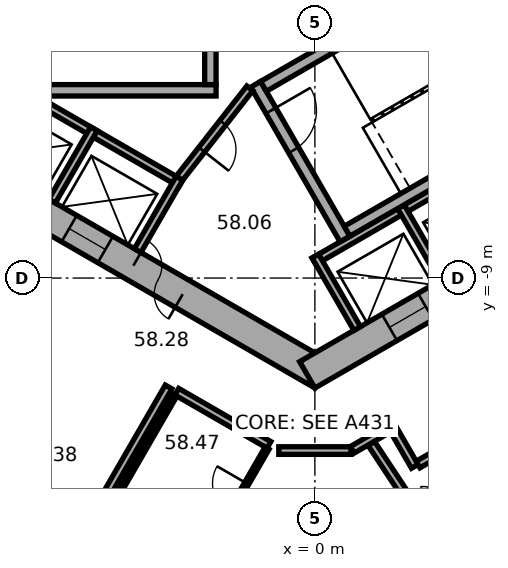
"""IFC4 building model, lengths in metres.
Left out: names, types, materials, properties, quantities, classifications, styles, units other than length and angle.
Written with IfcOpenShell. Run it as: python <this file> out.ifc"""

import sys

from ifc_helpers import new_model, si_unit, direction, frame, frame_2d, origin, place, context, subcontext, project, spatial, rectangle, extrude, element, fill, save


model = new_model("IFC4")
c1 = context("Model", 3, precision=1e-05, world=origin(), true_north=direction((0.0, 1.0)))
c2 = subcontext(c1, "Body", "Model", "MODEL_VIEW")
j1 = project(units=[si_unit("LENGTHUNIT", "METRE"), si_unit("PLANEANGLEUNIT", "RADIAN")], contexts=[c1])
p1 = place(None, origin())
s1 = spatial("IfcSite", under=j1, at=p1, CompositionType="ELEMENT")
p2 = place(p1, origin())
s2 = spatial("IfcBuilding", under=s1, at=p2, CompositionType="ELEMENT")
p3 = place(p2, frame((0.0, 0.0, 236.5)))
s3 = spatial("IfcBuildingStorey", under=s2, at=p3, CompositionType="ELEMENT", Elevation=236.5)
p4 = place(p3, frame((-10.1, -5.6, 0.0), z_axis=(0.0, 0.0, 1.0), x_axis=(0.866023897231, -0.500002609418, 0.0)))
e1 = element("IfcWall", 1, at=p4, inside=s3, PredefinedType="SHEAR", context=c2, shape_type="SweptSolid", body=[
    extrude(rectangle(XDim=11.894, YDim=0.8, at=frame_2d((5.947, 0.0))), origin(), (0.0, 0.0, 1.0), 3.7),
])
p5 = place(p4, frame((6.147, 0.0, 0.0)))
e2 = element("IfcOpeningElement", 2, at=p5, cuts=e1, PredefinedType="OPENING", context=c2, shape_type="SweptSolid", body=[
    extrude(rectangle(XDim=1.5, YDim=2.1, at=frame_2d((0.75, 1.05))), frame((0.0, 0.41, 0.0), z_axis=(0.0, -1.0, 0.0), x_axis=(1.0, 0.0, 0.0)), (0.0, 0.0, 1.0), 0.82),
])
p6 = place(p4, frame((1.597, 0.0, 0.0)))
e3 = element("IfcOpeningElement", 3, at=p6, cuts=e1, PredefinedType="OPENING", context=c2, shape_type="SweptSolid", body=[
    extrude(rectangle(XDim=1.1, YDim=2.1, at=frame_2d((0.55, 1.05))), frame((0.0, 0.41, 0.0), z_axis=(0.0, -1.0, 0.0), x_axis=(1.0, 0.0, 0.0)), (0.0, 0.0, 1.0), 0.82),
])
p7 = place(p4, frame((4.197, 0.0, 0.0)))
e4 = element("IfcOpeningElement", 4, at=p7, cuts=e1, PredefinedType="OPENING", context=c2, shape_type="SweptSolid", body=[
    extrude(rectangle(XDim=1.1, YDim=2.1, at=frame_2d((0.55, 1.05))), frame((0.0, 0.41, 0.0), z_axis=(0.0, -1.0, 0.0), x_axis=(1.0, 0.0, 0.0)), (0.0, 0.0, 1.0), 0.82),
])
p8 = place(p3, frame((-0.2, -11.547, 0.0), z_axis=(0.0, 0.0, 1.0), x_axis=(0.866023897231, 0.500002609418, 0.0)))
e5 = element("IfcWall", 5, at=p8, inside=s3, PredefinedType="SHEAR", context=c2, shape_type="SweptSolid", body=[
    extrude(rectangle(XDim=11.894, YDim=0.8, at=frame_2d((5.947, 0.0))), origin(), (0.0, 0.0, 1.0), 3.7),
])
p9 = place(p8, frame((2.497, 0.0, 0.0)))
e6 = element("IfcOpeningElement", 6, at=p9, cuts=e5, PredefinedType="OPENING", context=c2, shape_type="SweptSolid", body=[
    extrude(rectangle(XDim=1.1, YDim=2.1, at=frame_2d((0.55, 1.05))), frame((0.0, 0.41, 0.0), z_axis=(0.0, -1.0, 0.0), x_axis=(1.0, 0.0, 0.0)), (0.0, 0.0, 1.0), 0.82),
])
p10 = place(p8, frame((5.097, 0.0, 0.0)))
e7 = element("IfcOpeningElement", 7, at=p10, cuts=e5, PredefinedType="OPENING", context=c2, shape_type="SweptSolid", body=[
    extrude(rectangle(XDim=1.1, YDim=2.1, at=frame_2d((0.55, 1.05))), frame((0.0, 0.41, 0.0), z_axis=(0.0, -1.0, 0.0), x_axis=(1.0, 0.0, 0.0)), (0.0, 0.0, 1.0), 0.82),
])
p11 = place(p8, frame((7.697, 0.0, 0.0)))
e8 = element("IfcOpeningElement", 8, at=p11, cuts=e5, PredefinedType="OPENING", context=c2, shape_type="SweptSolid", body=[
    extrude(rectangle(XDim=1.1, YDim=2.1, at=frame_2d((0.55, 1.05))), frame((0.0, 0.41, 0.0), z_axis=(0.0, -1.0, 0.0), x_axis=(1.0, 0.0, 0.0)), (0.0, 0.0, 1.0), 0.82),
])
p12 = place(p3, frame((-17.664, -13.415, 0.0), z_axis=(0.0, 0.0, 1.0), x_axis=(0.866026555358, -0.49999800541, 0.0)))
e9 = element("IfcWall", 9, at=p12, inside=s3, PredefinedType="STANDARD", context=c2, shape_type="SweptSolid", body=[
    extrude(rectangle(XDim=18.841, YDim=0.2, at=frame_2d((9.421, 0.0))), origin(), (0.0, 0.0, 1.0), 3.7),
])
p13 = place(p12, frame((1.254, 0.0, 0.9)))
e10 = element("IfcOpeningElement", 10, at=p13, cuts=e9, PredefinedType="OPENING", context=c2, shape_type="SweptSolid", body=[
    extrude(rectangle(XDim=2.2, YDim=2.0, at=frame_2d((1.1, 1.0))), frame((0.0, 0.11, 0.0), z_axis=(0.0, -1.0, 0.0), x_axis=(1.0, 0.0, 0.0)), (0.0, 0.0, 1.0), 0.22),
])
p14 = place(p12, frame((4.788, 0.0, 0.9)))
e11 = element("IfcOpeningElement", 11, at=p14, cuts=e9, PredefinedType="OPENING", context=c2, shape_type="SweptSolid", body=[
    extrude(rectangle(XDim=2.2, YDim=2.0, at=frame_2d((1.1, 1.0))), frame((0.0, 0.11, 0.0), z_axis=(0.0, -1.0, 0.0), x_axis=(1.0, 0.0, 0.0)), (0.0, 0.0, 1.0), 0.22),
])
p15 = place(p12, frame((8.322, 0.0, 0.9)))
e12 = element("IfcOpeningElement", 12, at=p15, cuts=e9, PredefinedType="OPENING", context=c2, shape_type="SweptSolid", body=[
    extrude(rectangle(XDim=2.2, YDim=2.0, at=frame_2d((1.1, 1.0))), frame((0.0, 0.11, 0.0), z_axis=(0.0, -1.0, 0.0), x_axis=(1.0, 0.0, 0.0)), (0.0, 0.0, 1.0), 0.22),
])
p16 = place(p12, frame((11.855, 0.0, 0.9)))
e13 = element("IfcOpeningElement", 13, at=p16, cuts=e9, PredefinedType="OPENING", context=c2, shape_type="SweptSolid", body=[
    extrude(rectangle(XDim=2.2, YDim=2.0, at=frame_2d((1.1, 1.0))), frame((0.0, 0.11, 0.0), z_axis=(0.0, -1.0, 0.0), x_axis=(1.0, 0.0, 0.0)), (0.0, 0.0, 1.0), 0.22),
])
p17 = place(p12, frame((15.389, 0.0, 0.9)))
e14 = element("IfcOpeningElement", 14, at=p17, cuts=e9, PredefinedType="OPENING", context=c2, shape_type="SweptSolid", body=[
    extrude(rectangle(XDim=2.2, YDim=2.0, at=frame_2d((1.1, 1.0))), frame((0.0, 0.11, 0.0), z_axis=(0.0, -1.0, 0.0), x_axis=(1.0, 0.0, 0.0)), (0.0, 0.0, 1.0), 0.22),
])
p18 = place(p3, frame((2.739, -22.711, 0.0), z_axis=(0.0, 0.0, 1.0), x_axis=(0.833885723098, 0.551937134838, 0.0)))
e15 = element("IfcWall", 15, at=p18, inside=s3, PredefinedType="STANDARD", context=c2, shape_type="SweptSolid", body=[
    extrude(rectangle(XDim=18.841, YDim=0.2, at=frame_2d((9.421, 0.0))), origin(), (0.0, 0.0, 1.0), 3.7),
])
p19 = place(p18, frame((1.252, 0.0, 0.9)))
e16 = element("IfcOpeningElement", 16, at=p19, cuts=e15, PredefinedType="OPENING", context=c2, shape_type="SweptSolid", body=[
    extrude(rectangle(XDim=2.2, YDim=2.0, at=frame_2d((1.1, 1.0))), frame((0.0, 0.11, 0.0), z_axis=(0.0, -1.0, 0.0), x_axis=(1.0, 0.0, 0.0)), (0.0, 0.0, 1.0), 0.22),
])
p20 = place(p18, frame((4.786, 0.0, 0.9)))
e17 = element("IfcOpeningElement", 17, at=p20, cuts=e15, PredefinedType="OPENING", context=c2, shape_type="SweptSolid", body=[
    extrude(rectangle(XDim=2.2, YDim=2.0, at=frame_2d((1.1, 1.0))), frame((0.0, 0.11, 0.0), z_axis=(0.0, -1.0, 0.0), x_axis=(1.0, 0.0, 0.0)), (0.0, 0.0, 1.0), 0.22),
])
p21 = place(p18, frame((8.32, 0.0, 0.9)))
e18 = element("IfcOpeningElement", 18, at=p21, cuts=e15, PredefinedType="OPENING", context=c2, shape_type="SweptSolid", body=[
    extrude(rectangle(XDim=2.2, YDim=2.0, at=frame_2d((1.1, 1.0))), frame((0.0, 0.11, 0.0), z_axis=(0.0, -1.0, 0.0), x_axis=(1.0, 0.0, 0.0)), (0.0, 0.0, 1.0), 0.22),
])
p22 = place(p18, frame((11.854, 0.0, 0.9)))
e19 = element("IfcOpeningElement", 19, at=p22, cuts=e15, PredefinedType="OPENING", context=c2, shape_type="SweptSolid", body=[
    extrude(rectangle(XDim=2.2, YDim=2.0, at=frame_2d((1.1, 1.0))), frame((0.0, 0.11, 0.0), z_axis=(0.0, -1.0, 0.0), x_axis=(1.0, 0.0, 0.0)), (0.0, 0.0, 1.0), 0.22),
])
p23 = place(p18, frame((15.387, 0.0, 0.9)))
e20 = element("IfcOpeningElement", 20, at=p23, cuts=e15, PredefinedType="OPENING", context=c2, shape_type="SweptSolid", body=[
    extrude(rectangle(XDim=2.2, YDim=2.0, at=frame_2d((1.1, 1.0))), frame((0.0, 0.11, 0.0), z_axis=(0.0, -1.0, 0.0), x_axis=(1.0, 0.0, 0.0)), (0.0, 0.0, 1.0), 0.22),
])
p24 = place(p3, frame((-8.203, -3.809, 0.0), z_axis=(0.0, 0.0, 1.0), x_axis=(0.866028230842, -0.499995103361, 0.0)))
e21 = element("IfcWall", 21, at=p24, inside=s3, PredefinedType="PARTITIONING", context=c2, shape_type="SweptSolid", body=[
    extrude(rectangle(XDim=5.4, YDim=0.2, at=frame_2d((2.7, 0.0))), origin(), (0.0, 0.0, 1.0), 3.42),
])
p25 = place(p3, frame((-5.815, -5.072, 0.0), z_axis=(0.0, 0.0, 1.0), x_axis=(-0.499946605688, -0.86605622881, 0.0)))
e22 = element("IfcWall", 22, at=p25, inside=s3, PredefinedType="PARTITIONING", context=c2, shape_type="SweptSolid", body=[
    extrude(rectangle(XDim=2.2, YDim=0.2, at=frame_2d((1.1, 0.0))), origin(), (0.0, 0.0, 1.0), 3.42),
])
p26 = place(p3, frame((-3.563, -6.372, 0.0), z_axis=(0.0, 0.0, 1.0), x_axis=(-0.499994660107, -0.866028486751, 0.0)))
e23 = element("IfcWall", 23, at=p26, inside=s3, PredefinedType="PARTITIONING", context=c2, shape_type="SweptSolid", body=[
    extrude(rectangle(XDim=2.2, YDim=0.2, at=frame_2d((1.1, 0.0))), origin(), (0.0, 0.0, 1.0), 3.42),
])
p27 = place(p3, frame((-0.024, -8.559, 0.0), z_axis=(0.0, 0.0, 1.0), x_axis=(0.866026010844, 0.49999894854, 0.0)))
e24 = element("IfcWall", 24, at=p27, inside=s3, PredefinedType="PARTITIONING", context=c2, shape_type="SweptSolid", body=[
    extrude(rectangle(XDim=8.0, YDim=0.2, at=frame_2d((4.0, 0.0))), origin(), (0.0, 0.0, 1.0), 3.42),
])
for number, where, z_axis, x_axis in (
    (25, (0.013, -8.422, 0.0), (0.0, 0.0, 1.0), (0.5, -0.866, 0.0)),
    (26, (2.264, -7.122, 0.0), (0.0, 0.0, 1.0), (0.5, -0.866, 0.0)),
):
    element("IfcWall", number, at=place(p3, frame(where, z_axis=z_axis, x_axis=x_axis)), inside=s3, PredefinedType="PARTITIONING", context=c2, shape_type="SweptSolid", body=[
        extrude(rectangle(XDim=2.2, YDim=0.2, at=frame_2d((1.1, 0.0))), origin(), (0.0, 0.0, 1.0), 3.42),
    ])
p28 = place(p3, frame((-2.6, -4.06, 0.0), z_axis=(0.0, 0.0, 1.0), x_axis=(-1.0, 0.0, 0.0)))
e27 = element("IfcWall", 27, at=p28, inside=s3, PredefinedType="SHEAR", context=c2, shape_type="SweptSolid", body=[
    extrude(rectangle(XDim=4.7, YDim=0.3, at=frame_2d((2.35, 0.0))), origin(), (0.0, 0.0, 1.0), 3.42),
])
p29 = place(p3, frame((-2.75, 3.15, 0.0), z_axis=(0.0, 0.0, 1.0), x_axis=(0.0, -1.0, 0.0)))
e28 = element("IfcWall", 28, at=p29, inside=s3, PredefinedType="SHEAR", context=c2, shape_type="SweptSolid", body=[
    extrude(rectangle(XDim=7.06, YDim=0.3, at=frame_2d((3.53, 0.0))), origin(), (0.0, 0.0, 1.0), 3.42),
])
p30 = place(p3, frame((-1.558, -3.902, 0.0), z_axis=(0.0, 0.0, 1.0), x_axis=(0.499977259774, -0.866038532462, 0.0)))
e29 = element("IfcWall", 29, at=p30, inside=s3, PredefinedType="SHEAR", context=c2, shape_type="SweptSolid", body=[
    extrude(rectangle(XDim=4.7, YDim=0.3, at=frame_2d((2.35, 0.0))), origin(), (0.0, 0.0, 1.0), 3.42),
])
p31 = place(p30, frame((0.8, 0.0, 0.0)))
e30 = element("IfcOpeningElement", 30, at=p31, cuts=e29, PredefinedType="OPENING", context=c2, shape_type="SweptSolid", body=[
    extrude(rectangle(XDim=1.2, YDim=2.1, at=frame_2d((0.6, 1.05))), frame((0.0, 0.16, 0.0), z_axis=(0.0, -1.0, 0.0), x_axis=(1.0, 0.0, 0.0)), (0.0, 0.0, 1.0), 0.32),
])
for number, where, z_axis, x_axis in (
    (31, (-1.353, -3.957, 0.0), (0.0, 0.0, 1.0), (0.866, 0.5, 0.0)),
    (32, (0.847, -7.767, 0.0), (0.0, 0.0, 1.0), (0.866, 0.5, 0.0)),
):
    element("IfcWall", number, at=place(p3, frame(where, z_axis=z_axis, x_axis=x_axis)), inside=s3, PredefinedType="SHEAR", context=c2, shape_type="SweptSolid", body=[
        extrude(rectangle(XDim=7.06, YDim=0.3, at=frame_2d((3.53, 0.0))), origin(), (0.0, 0.0, 1.0), 3.42),
    ])
p32 = place(p3, frame((-1.712, -4.008, 0.0), z_axis=(0.0, 0.0, 1.0), x_axis=(-0.616549420702, -0.787316208287, 0.0)))
e33 = element("IfcWall", 33, at=p32, inside=s3, PredefinedType="PARTITIONING", context=c2, shape_type="SweptSolid", body=[
    extrude(rectangle(XDim=3.002, YDim=0.2, at=frame_2d((1.501, 0.0))), origin(), (0.0, 0.0, 1.0), 3.42),
])
p33 = place(p32, frame((1.15, 0.0, 0.0)))
e34 = element("IfcOpeningElement", 34, at=p33, cuts=e33, PredefinedType="OPENING", context=c2, shape_type="SweptSolid", body=[
    extrude(rectangle(XDim=0.9, YDim=2.1, at=frame_2d((0.45, 1.05))), frame((0.0, 0.11, 0.0), z_axis=(0.0, -1.0, 0.0), x_axis=(1.0, 0.0, 0.0)), (0.0, 0.0, 1.0), 0.22),
])
p34 = place(p3, frame((-7.525, -18.23, 0.0), z_axis=(0.0, 0.0, 1.0), x_axis=(0.499983153418, 0.866035129944, 0.0)))
e35 = element("IfcWall", 35, at=p34, inside=s3, PredefinedType="PARTITIONING", context=c2, shape_type="SweptSolid", body=[
    extrude(rectangle(XDim=7.35, YDim=0.2, at=frame_2d((3.675, 0.0))), origin(), (0.0, 0.0, 1.0), 3.42),
])
p35 = place(p34, frame((2.975, 0.0, 0.0)))
e36 = element("IfcOpeningElement", 36, at=p35, cuts=e35, PredefinedType="OPENING", context=c2, shape_type="SweptSolid", body=[
    extrude(rectangle(XDim=1.0, YDim=2.1, at=frame_2d((0.5, 1.05))), frame((0.0, 0.11, 0.0), z_axis=(0.0, -1.0, 0.0), x_axis=(1.0, 0.0, 0.0)), (0.0, 0.0, 1.0), 0.22),
])
p36 = place(p3, frame((-5.233, -14.761, 0.0), z_axis=(0.0, 0.0, 1.0), x_axis=(0.499967891604, 0.866043940782, 0.0)))
e37 = element("IfcWall", 37, at=p36, inside=s3, PredefinedType="PARTITIONING", context=c2, shape_type="SweptSolid", body=[
    extrude(rectangle(XDim=3.1, YDim=0.12, at=frame_2d((1.55, 0.0))), origin(), (0.0, 0.0, 1.0), 3.42),
])
p37 = place(p3, frame((-3.634, -11.99, 0.0), z_axis=(0.0, 0.0, 1.0), x_axis=(0.866018616679, -0.500011755427, 0.0)))
e38 = element("IfcWall", 38, at=p37, inside=s3, PredefinedType="PARTITIONING", context=c2, shape_type="SweptSolid", body=[
    extrude(rectangle(XDim=2.8, YDim=0.2, at=frame_2d((1.4, 0.0))), origin(), (0.0, 0.0, 1.0), 3.42),
])
p38 = place(p3, frame((-1.259, -13.476, 0.0), z_axis=(0.0, 0.0, 1.0), x_axis=(-0.500026023896, -0.86601037836, 0.0)))
e39 = element("IfcWall", 39, at=p38, inside=s3, PredefinedType="PARTITIONING", context=c2, shape_type="SweptSolid", body=[
    extrude(rectangle(XDim=3.04, YDim=0.12, at=frame_2d((1.52, 0.0))), origin(), (0.0, 0.0, 1.0), 3.42),
])
p39 = place(p38, frame((1.07, 0.0, 0.0)))
e40 = element("IfcOpeningElement", 40, at=p39, cuts=e39, PredefinedType="OPENING", context=c2, shape_type="SweptSolid", body=[
    extrude(rectangle(XDim=0.9, YDim=2.1, at=frame_2d((0.45, 1.05))), frame((0.0, 0.07, 0.0), z_axis=(0.0, -1.0, 0.0), x_axis=(1.0, 0.0, 0.0)), (0.0, 0.0, 1.0), 0.14),
])
p40 = place(p3, frame((-0.95, -13.539, 0.0), z_axis=(0.0, 0.0, 1.0), x_axis=(1.0, 0.0, 0.0)))
e41 = element("IfcWall", 41, at=p40, inside=s3, PredefinedType="PARTITIONING", context=c2, shape_type="SweptSolid", body=[
    extrude(rectangle(XDim=1.9, YDim=0.2, at=frame_2d((0.95, 0.0))), origin(), (0.0, 0.0, 1.0), 3.42),
])
p41 = place(p3, frame((0.985, -13.519, 0.0), z_axis=(0.0, 0.0, 1.0), x_axis=(0.866054082991, 0.499950322867, 0.0)))
e42 = element("IfcWall", 42, at=p41, inside=s3, PredefinedType="PARTITIONING", context=c2, shape_type="SweptSolid", body=[
    extrude(rectangle(XDim=1.206, YDim=0.2, at=frame_2d((0.603, 0.0))), origin(), (0.0, 0.0, 1.0), 3.42),
])
p42 = place(p3, frame((2.079, -13.003, 0.0), z_axis=(0.0, 0.0, 1.0), x_axis=(0.500074377092, -0.865982457891, 0.0)))
e43 = element("IfcWall", 43, at=p42, inside=s3, PredefinedType="PARTITIONING", context=c2, shape_type="SweptSolid", body=[
    extrude(rectangle(XDim=1.101, YDim=0.2, at=frame_2d((0.55, 0.0))), origin(), (0.0, 0.0, 1.0), 3.42),
])
p43 = place(p3, frame((2.716, -13.906, 0.0), z_axis=(0.0, 0.0, 1.0), x_axis=(0.866040290674, 0.499974214264, 0.0)))
e44 = element("IfcWall", 44, at=p43, inside=s3, PredefinedType="PARTITIONING", context=c2, shape_type="SweptSolid", body=[
    extrude(rectangle(XDim=8.702, YDim=0.2, at=frame_2d((4.351, 0.0))), origin(), (0.0, 0.0, 1.0), 3.42),
])
p44 = place(p43, frame((2.679, 0.0, 0.0)))
e45 = element("IfcOpeningElement", 45, at=p44, cuts=e44, PredefinedType="OPENING", context=c2, shape_type="SweptSolid", body=[
    extrude(rectangle(XDim=1.0, YDim=2.1, at=frame_2d((0.5, 1.05))), frame((0.0, 0.11, 0.0), z_axis=(0.0, -1.0, 0.0), x_axis=(1.0, 0.0, 0.0)), (0.0, 0.0, 1.0), 0.22),
])
p45 = place(p3, frame((5.677, -19.687, 0.0), z_axis=(0.0, 0.0, 1.0), x_axis=(-0.551936619203, 0.833886064389, 0.0)))
e46 = element("IfcWall", 46, at=p45, inside=s3, PredefinedType="PARTITIONING", context=c2, shape_type="SweptSolid", body=[
    extrude(rectangle(XDim=7.592, YDim=0.2, at=frame_2d((3.796, 0.0))), origin(), (0.0, 0.0, 1.0), 3.42),
])
p46 = place(p5, origin())
e47 = element("IfcDoor", 47, at=p46, inside=s3, OperationType="DOUBLE_DOOR_SINGLE_SWING", PredefinedType="DOOR", context=c2, shape_type="SweptSolid", body=[
    extrude(rectangle(XDim=1.5, YDim=2.1, at=frame_2d((0.75, 1.05))), frame((0.0, 0.025, 0.0), z_axis=(0.0, -1.0, 0.0), x_axis=(1.0, 0.0, 0.0)), (0.0, 0.0, 1.0), 0.05),
])
fill(e2, e47)
p47 = place(p31, origin())
e48 = element("IfcDoor", 48, at=p47, inside=s3, OperationType="SINGLE_SWING_RIGHT", PredefinedType="DOOR", context=c2, shape_type="SweptSolid", body=[
    extrude(rectangle(XDim=1.2, YDim=2.1, at=frame_2d((0.6, 1.05))), frame((0.0, 0.025, 0.0), z_axis=(0.0, -1.0, 0.0), x_axis=(1.0, 0.0, 0.0)), (0.0, 0.0, 1.0), 0.05),
])
fill(e30, e48)
p48 = place(p33, origin())
e49 = element("IfcDoor", 49, at=p48, inside=s3, OperationType="SINGLE_SWING_LEFT", PredefinedType="DOOR", context=c2, shape_type="SweptSolid", body=[
    extrude(rectangle(XDim=0.9, YDim=2.1, at=frame_2d((0.45, 1.05))), frame((0.0, 0.025, 0.0), z_axis=(0.0, -1.0, 0.0), x_axis=(1.0, 0.0, 0.0)), (0.0, 0.0, 1.0), 0.05),
])
fill(e34, e49)
p49 = place(p7, origin())
e50 = element("IfcDoor", 50, at=p49, inside=s3, OperationType="DOUBLE_DOOR_SLIDING", PredefinedType="DOOR", context=c2, shape_type="SweptSolid", body=[
    extrude(rectangle(XDim=1.1, YDim=2.1, at=frame_2d((0.55, 1.05))), frame((0.0, 0.025, 0.0), z_axis=(0.0, -1.0, 0.0), x_axis=(1.0, 0.0, 0.0)), (0.0, 0.0, 1.0), 0.05),
])
fill(e4, e50)
p50 = place(p9, origin())
e51 = element("IfcDoor", 51, at=p50, inside=s3, OperationType="DOUBLE_DOOR_SLIDING", PredefinedType="DOOR", context=c2, shape_type="SweptSolid", body=[
    extrude(rectangle(XDim=1.1, YDim=2.1, at=frame_2d((0.55, 1.05))), frame((0.0, 0.025, 0.0), z_axis=(0.0, -1.0, 0.0), x_axis=(1.0, 0.0, 0.0)), (0.0, 0.0, 1.0), 0.05),
])
fill(e6, e51)
p51 = place(p39, origin())
e52 = element("IfcDoor", 52, at=p51, inside=s3, OperationType="SINGLE_SWING_LEFT", PredefinedType="DOOR", context=c2, shape_type="SweptSolid", body=[
    extrude(rectangle(XDim=0.9, YDim=2.1, at=frame_2d((0.45, 1.05))), frame((0.0, 0.025, 0.0), z_axis=(0.0, -1.0, 0.0), x_axis=(1.0, 0.0, 0.0)), (0.0, 0.0, 1.0), 0.05),
])
fill(e40, e52)
save(model, sys.argv[1])
